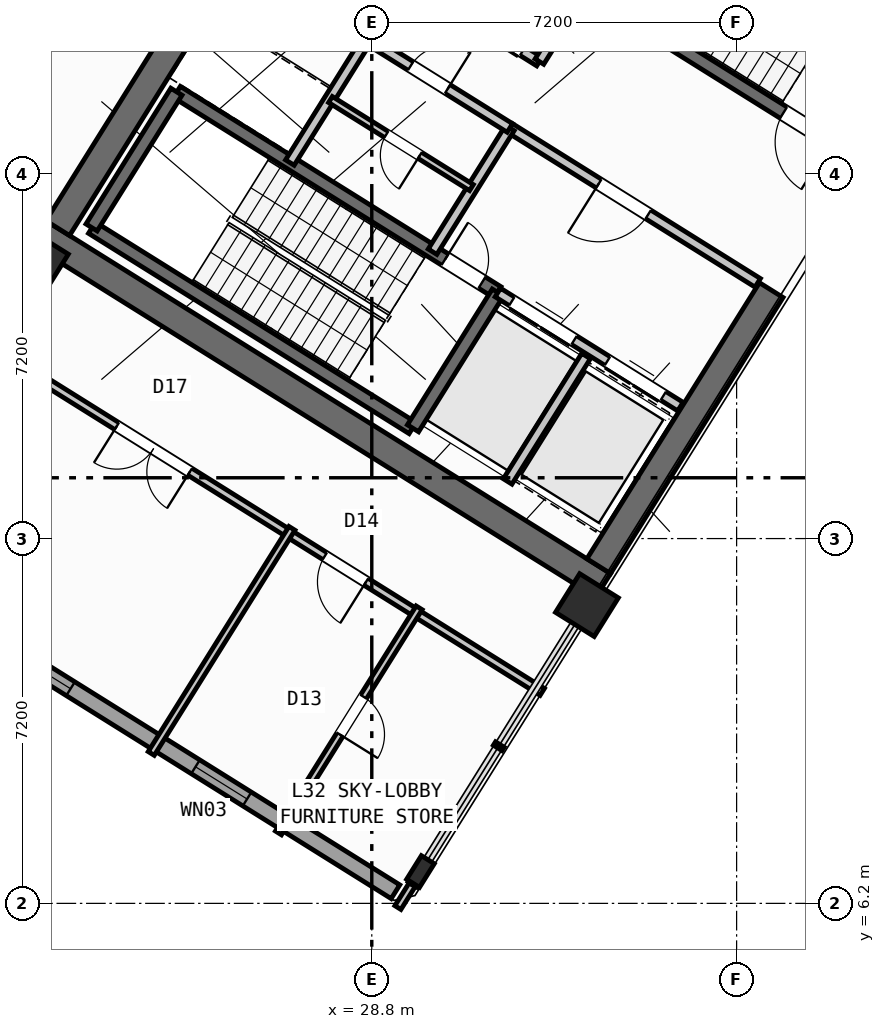
"""IFC4 building model, lengths in metres.
Left out: names, types, materials, properties, quantities, classifications, styles, units other than length and angle.
Written with IfcOpenShell. Run it as: python <this file> out.ifc"""

import sys

from ifc_helpers import new_model, si_unit, direction, frame, frame_2d, origin, origin_2d, place, context, subcontext, project, spatial, rectangle, hollow_rectangle, i_section, extrude, source, transform, mapped, element, fill, save


model = new_model("IFC4")
c1 = context("Model", 3, precision=1e-05, world=origin(), true_north=direction((0.0, 1.0)))
c2 = subcontext(c1, "Body", "Model", "MODEL_VIEW")
j1 = project(units=[si_unit("LENGTHUNIT", "METRE"), si_unit("PLANEANGLEUNIT", "RADIAN")], contexts=[c1])
p1 = place(None, origin())
s1 = spatial("IfcSite", under=j1, at=p1, CompositionType="ELEMENT")
p2 = place(p1, origin())
s2 = spatial("IfcBuilding", under=s1, at=p2, CompositionType="ELEMENT")
p3 = place(p2, frame((0.0, 0.0, 127.8)))
s3 = spatial("IfcBuildingStorey", under=s2, at=p3, CompositionType="ELEMENT", Elevation=127.8)
p4 = place(p3, frame((33.366, 12.477, 0.0), z_axis=(0.0, 0.0, 1.0), x_axis=(-0.848047359947, 0.529920442413, 0.0)))
e1 = element("IfcWall", 1, at=p4, inside=s3, PredefinedType="SHEAR", context=c2, shape_type="SweptSolid", body=[
    extrude(rectangle(XDim=13.14, YDim=0.55, at=frame_2d((6.57, 0.0))), origin(), (0.0, 0.0, 1.0), 4.55),
])
p5 = place(p3, frame((36.683, 18.304, 0.0), z_axis=(0.0, 0.0, 1.0), x_axis=(-0.529896466841, -0.848062341122, 0.0)))
e2 = element("IfcWall", 2, at=p5, inside=s3, PredefinedType="SHEAR", context=c2, shape_type="SweptSolid", body=[
    extrude(rectangle(XDim=6.425, YDim=0.55, at=frame_2d((3.212, 0.0))), origin(), (0.0, 0.0, 1.0), 4.55),
])
p6 = place(p3, frame((26.007, 24.976, 0.0), z_axis=(0.0, 0.0, 1.0), x_axis=(-0.529923795287, -0.848045264823, 0.0)))
e3 = element("IfcWall", 3, at=p6, inside=s3, PredefinedType="SHEAR", context=c2, shape_type="SweptSolid", body=[
    extrude(rectangle(XDim=6.425, YDim=0.55, at=frame_2d((3.212, 0.0))), origin(), (0.0, 0.0, 1.0), 4.55),
])
m1 = source(origin(), c2, "Body", "SweptSolid", [
    extrude(hollow_rectangle(XDim=0.9, YDim=0.9, WallThickness=0.036, at=origin_2d()), origin(), (0.0, 0.0, 1.0), 4.8),
])
p7 = place(p3, frame((33.046, 12.087, 0.0), z_axis=(0.0, 0.0, 1.0), x_axis=(-0.848048096156, 0.529919264233, 0.0)))
e4 = element("IfcColumn", 4, at=p7, inside=s3, PredefinedType="COLUMN", context=c2, shape_type="MappedRepresentation", body=[
    mapped(m1, transform((0.0, 0.0, 0.0), scale=1.0)),
])
m2 = source(origin(), c2, "Body", "SweptSolid", [
    extrude(i_section(OverallWidth=0.3, OverallDepth=0.55, WebThickness=0.015, FlangeThickness=0.029, at=origin_2d()), origin(), (0.0, 0.0, 1.0), 4.8),
])
p8 = place(p3, frame((29.761, 6.829, 0.0), z_axis=(0.0, 0.0, 1.0), x_axis=(-0.848048096156, 0.529919264233, 0.0)))
e5 = element("IfcColumn", 5, at=p8, inside=s3, PredefinedType="COLUMN", context=c2, shape_type="MappedRepresentation", body=[
    mapped(m2, transform((0.0, 0.0, 0.0), scale=1.0)),
])
p9 = place(p3, frame((22.191, 18.87, 0.0), z_axis=(0.0, 0.0, 1.0), x_axis=(-0.848048096156, 0.529919264233, 0.0)))
e6 = element("IfcColumn", 6, at=p9, inside=s3, PredefinedType="COLUMN", context=c2, shape_type="MappedRepresentation", body=[
    mapped(m1, transform((0.0, 0.0, 0.0), scale=1.0)),
])
p10 = place(p3, frame((29.268, 6.429, 0.0), z_axis=(0.0, 0.0, 1.0), x_axis=(-0.848049971435, 0.529916263149, 0.0)))
e7 = element("IfcWall", 7, at=p10, inside=s3, PredefinedType="STANDARD", context=c2, shape_type="SweptSolid", body=[
    extrude(rectangle(XDim=31.588, YDim=0.32, at=frame_2d((15.794, 0.0))), origin(), (0.0, 0.0, 1.0), 4.55),
])
p11 = place(p10, frame((15.901, 0.0, 0.0)))
e8 = element("IfcOpeningElement", 8, at=p11, cuts=e7, PredefinedType="OPENING", context=c2, shape_type="SweptSolid", body=[
    extrude(rectangle(XDim=1.2, YDim=2.15, at=frame_2d((0.6, 1.075))), frame((0.0, 0.17, 0.0), z_axis=(0.0, -1.0, 0.0), x_axis=(1.0, 0.0, 0.0)), (0.0, 0.0, 1.0), 0.34),
])
p12 = place(p10, frame((3.454, 0.0, 0.95)))
e9 = element("IfcOpeningElement", 9, at=p12, cuts=e7, PredefinedType="OPENING", context=c2, shape_type="SweptSolid", body=[
    extrude(rectangle(XDim=1.2, YDim=1.4, at=frame_2d((0.6, 0.7))), frame((0.0, 0.17, 0.0), z_axis=(0.0, -1.0, 0.0), x_axis=(1.0, 0.0, 0.0)), (0.0, 0.0, 1.0), 0.34),
])
p13 = place(p10, frame((7.561, 0.0, 0.85)))
e10 = element("IfcOpeningElement", 10, at=p13, cuts=e7, PredefinedType="OPENING", context=c2, shape_type="SweptSolid", body=[
    extrude(rectangle(XDim=1.8, YDim=1.5, at=frame_2d((0.9, 0.75))), frame((0.0, 0.17, 0.0), z_axis=(0.0, -1.0, 0.0), x_axis=(1.0, 0.0, 0.0)), (0.0, 0.0, 1.0), 0.34),
])
p14 = place(p10, frame((21.594, 0.0, 0.95)))
e11 = element("IfcOpeningElement", 11, at=p14, cuts=e7, PredefinedType="OPENING", context=c2, shape_type="SweptSolid", body=[
    extrude(rectangle(XDim=1.2, YDim=1.4, at=frame_2d((0.6, 0.7))), frame((0.0, 0.17, 0.0), z_axis=(0.0, -1.0, 0.0), x_axis=(1.0, 0.0, 0.0)), (0.0, 0.0, 1.0), 0.34),
])
p15 = place(p10, frame((29.878, 0.0, 1.0)))
e12 = element("IfcOpeningElement", 12, at=p15, cuts=e7, PredefinedType="OPENING", context=c2, shape_type="SweptSolid", body=[
    extrude(rectangle(XDim=0.9, YDim=1.25, at=frame_2d((0.45, 0.625))), frame((0.0, 0.17, 0.0), z_axis=(0.0, -1.0, 0.0), x_axis=(1.0, 0.0, 0.0)), (0.0, 0.0, 1.0), 0.34),
])
p16 = place(p10, frame((27.364, 0.0, 1.0)))
e13 = element("IfcOpeningElement", 13, at=p16, cuts=e7, PredefinedType="OPENING", context=c2, shape_type="SweptSolid", body=[
    extrude(rectangle(XDim=0.9, YDim=1.25, at=frame_2d((0.45, 0.625))), frame((0.0, 0.17, 0.0), z_axis=(0.0, -1.0, 0.0), x_axis=(1.0, 0.0, 0.0)), (0.0, 0.0, 1.0), 0.34),
])
p17 = place(p3, frame((29.605, 15.581, 0.0), z_axis=(0.0, 0.0, 1.0), x_axis=(-0.848036911448, 0.529937163087, 0.0)))
e14 = element("IfcWall", 14, at=p17, inside=s3, PredefinedType="SHEAR", context=c2, shape_type="SweptSolid", body=[
    extrude(rectangle(XDim=7.46, YDim=0.26, at=frame_2d((3.73, 0.0))), origin(), (0.0, 0.0, 1.0), 4.55),
])
p18 = place(p3, frame((31.28, 18.261, 0.0), z_axis=(0.0, 0.0, 1.0), x_axis=(-0.848051618787, 0.529913626805, 0.0)))
e15 = element("IfcWall", 15, at=p18, inside=s3, PredefinedType="SHEAR", context=c2, shape_type="SweptSolid", body=[
    extrude(rectangle(XDim=7.46, YDim=0.26, at=frame_2d((3.73, 0.0))), origin(), (0.0, 0.0, 1.0), 4.55),
])
p19 = place(p18, frame((0.36, 0.0, 0.0)))
e16 = element("IfcOpeningElement", 16, at=p19, cuts=e15, PredefinedType="OPENING", context=c2, shape_type="SweptSolid", body=[
    extrude(rectangle(XDim=0.86, YDim=2.05, at=frame_2d((0.43, 1.025))), frame((0.0, 0.14, 0.0), z_axis=(0.0, -1.0, 0.0), x_axis=(1.0, 0.0, 0.0)), (0.0, 0.0, 1.0), 0.28),
])
p20 = place(p3, frame((31.288, 18.256, 0.0), z_axis=(0.0, 0.0, 1.0), x_axis=(-0.529943379326, -0.848033026897, 0.0)))
e17 = element("IfcWall", 17, at=p20, inside=s3, PredefinedType="SHEAR", context=c2, shape_type="SweptSolid", body=[
    extrude(rectangle(XDim=3.16, YDim=0.26, at=frame_2d((1.58, 0.0))), origin(), (0.0, 0.0, 1.0), 4.55),
])
p21 = place(p3, frame((24.945, 22.22, 0.0), z_axis=(0.0, 0.0, 1.0), x_axis=(-0.529908658664, -0.84805472316, 0.0)))
e18 = element("IfcWall", 18, at=p21, inside=s3, PredefinedType="SHEAR", context=c2, shape_type="SweptSolid", body=[
    extrude(rectangle(XDim=3.16, YDim=0.26, at=frame_2d((1.58, 0.0))), origin(), (0.0, 0.0, 1.0), 4.55),
])
p22 = place(p3, frame((38.046, 21.108, 0.0), z_axis=(0.0, 0.0, 1.0), x_axis=(-0.848054434086, 0.529909121291, 0.0)))
e19 = element("IfcWall", 19, at=p22, inside=s3, PredefinedType="SHEAR", context=c2, shape_type="SweptSolid", body=[
    extrude(rectangle(XDim=7.33, YDim=0.26, at=frame_2d((3.665, 0.0))), origin(), (0.0, 0.0, 1.0), 4.55),
])
p23 = place(p22, frame((0.22, 0.0, 0.0)))
e20 = element("IfcOpeningElement", 20, at=p23, cuts=e19, PredefinedType="OPENING", context=c2, shape_type="SweptSolid", body=[
    extrude(rectangle(XDim=1.1, YDim=2.1, at=frame_2d((0.55, 1.05))), frame((0.0, 0.14, 0.0), z_axis=(0.0, -1.0, 0.0), x_axis=(1.0, 0.0, 0.0)), (0.0, 0.0, 1.0), 0.28),
])
p24 = place(p3, frame((34.891, 16.005, 0.0), z_axis=(0.0, 0.0, 1.0), x_axis=(-0.848062873452, 0.529895614884, 0.0)))
e21 = element("IfcWall", 21, at=p24, inside=s3, PredefinedType="STANDARD", context=c2, shape_type="SweptSolid", body=[
    extrude(rectangle(XDim=4.248, YDim=0.2, at=frame_2d((2.124, 0.0))), origin(), (0.0, 0.0, 1.0), 4.54),
])
p25 = place(p24, frame((0.398, 0.0, 0.0)))
e22 = element("IfcOpeningElement", 22, at=p25, cuts=e21, PredefinedType="OPENING", context=c2, shape_type="SweptSolid", body=[
    extrude(rectangle(XDim=1.3, YDim=2.2, at=frame_2d((0.65, 1.1))), frame((0.0, 0.11, 0.0), z_axis=(0.0, -1.0, 0.0), x_axis=(1.0, 0.0, 0.0)), (0.0, 0.0, 1.0), 0.22),
])
p26 = place(p24, frame((2.473, 0.0, 0.0)))
e23 = element("IfcOpeningElement", 23, at=p26, cuts=e21, PredefinedType="OPENING", context=c2, shape_type="SweptSolid", body=[
    extrude(rectangle(XDim=1.45, YDim=2.25, at=frame_2d((0.725, 1.125))), frame((0.0, 0.11, 0.0), z_axis=(0.0, -1.0, 0.0), x_axis=(1.0, 0.0, 0.0)), (0.0, 0.0, 1.0), 0.22),
])
p27 = place(p3, frame((36.417, 18.447, 0.0), z_axis=(0.0, 0.0, 1.0), x_axis=(-0.848064879198, 0.529892404805, 0.0)))
e24 = element("IfcWall", 24, at=p27, inside=s3, PredefinedType="STANDARD", context=c2, shape_type="SweptSolid", body=[
    extrude(rectangle(XDim=5.768, YDim=0.2, at=frame_2d((2.884, 0.0))), origin(), (0.0, 0.0, 1.0), 4.54),
])
p28 = place(p27, frame((2.548, 0.0, 0.0)))
e25 = element("IfcOpeningElement", 25, at=p28, cuts=e24, PredefinedType="OPENING", context=c2, shape_type="SweptSolid", body=[
    extrude(rectangle(XDim=1.15, YDim=2.1, at=frame_2d((0.575, 1.05))), frame((0.0, 0.11, 0.0), z_axis=(0.0, -1.0, 0.0), x_axis=(1.0, 0.0, 0.0)), (0.0, 0.0, 1.0), 0.22),
])
p29 = place(p3, frame((32.108, 22.814, 0.0), z_axis=(0.0, 0.0, 1.0), x_axis=(-0.848042229521, 0.529928652696, 0.0)))
e26 = element("IfcWall", 26, at=p29, inside=s3, PredefinedType="STANDARD", context=c2, shape_type="SweptSolid", body=[
    extrude(rectangle(XDim=5.62, YDim=0.2, at=frame_2d((2.81, 0.0))), origin(), (0.0, 0.0, 1.0), 4.54),
])
p30 = place(p29, frame((0.39, 0.0, 0.0)))
e27 = element("IfcOpeningElement", 27, at=p30, cuts=e26, PredefinedType="OPENING", context=c2, shape_type="SweptSolid", body=[
    extrude(rectangle(XDim=1.1, YDim=2.15, at=frame_2d((0.55, 1.075))), frame((0.0, 0.11, 0.0), z_axis=(0.0, -1.0, 0.0), x_axis=(1.0, 0.0, 0.0)), (0.0, 0.0, 1.0), 0.22),
])
p31 = place(p29, frame((2.25, 0.0, 0.0)))
e28 = element("IfcOpeningElement", 28, at=p31, cuts=e26, PredefinedType="OPENING", context=c2, shape_type="SweptSolid", body=[
    extrude(rectangle(XDim=1.1, YDim=2.15, at=frame_2d((0.55, 1.075))), frame((0.0, 0.11, 0.0), z_axis=(0.0, -1.0, 0.0), x_axis=(1.0, 0.0, 0.0)), (0.0, 0.0, 1.0), 0.22),
])
p32 = place(p29, frame((4.11, 0.0, 0.0)))
e29 = element("IfcOpeningElement", 29, at=p32, cuts=e26, PredefinedType="OPENING", context=c2, shape_type="SweptSolid", body=[
    extrude(rectangle(XDim=1.1, YDim=2.15, at=frame_2d((0.55, 1.075))), frame((0.0, 0.11, 0.0), z_axis=(0.0, -1.0, 0.0), x_axis=(1.0, 0.0, 0.0)), (0.0, 0.0, 1.0), 0.22),
])
p33 = place(p3, frame((32.982, 24.213, 0.0), z_axis=(0.0, 0.0, 1.0), x_axis=(-0.529839334948, -0.84809803628, 0.0)))
e30 = element("IfcWall", 30, at=p33, inside=s3, PredefinedType="STANDARD", context=c2, shape_type="SweptSolid", body=[
    extrude(rectangle(XDim=1.65, YDim=0.2, at=frame_2d((0.825, 0.0))), origin(), (0.0, 0.0, 1.0), 4.54),
])
p34 = place(p3, frame((33.029, 17.003, 0.0), z_axis=(0.0, 0.0, 1.0), x_axis=(-0.529916267533, -0.848049968695, 0.0)))
e31 = element("IfcWall", 31, at=p34, inside=s3, PredefinedType="STANDARD", context=c2, shape_type="SweptSolid", body=[
    extrude(rectangle(XDim=2.92, YDim=0.2, at=frame_2d((1.46, 0.0))), origin(), (0.0, 0.0, 1.0), 4.54),
])
for number, where, z_axis, x_axis in (
    (32, (31.525, 21.504, 0.0), (0.0, 0.0, 1.0), (-0.53, -0.848, 0.0)),
    (33, (28.71, 23.263, 0.0), (0.0, 0.0, 1.0), (-0.53, -0.848, 0.0)),
):
    element("IfcWall", number, at=place(p3, frame(where, z_axis=z_axis, x_axis=x_axis)), inside=s3, PredefinedType="STANDARD", context=c2, shape_type="SweptSolid", body=[
        extrude(rectangle(XDim=2.88, YDim=0.2, at=frame_2d((1.44, 0.0))), origin(), (0.0, 0.0, 1.0), 4.54),
    ])
p35 = place(p3, frame((31.525, 21.504, 0.0), z_axis=(0.0, 0.0, 1.0), x_axis=(-0.848040211232, 0.529931882541, 0.0)))
e34 = element("IfcWall", 34, at=p35, inside=s3, PredefinedType="STANDARD", context=c2, shape_type="SweptSolid", body=[
    extrude(rectangle(XDim=6.218, YDim=0.2, at=frame_2d((3.109, 0.0))), origin(), (0.0, 0.0, 1.0), 4.54),
])
p36 = place(p35, frame((4.4, 0.0, 0.0)))
e35 = element("IfcOpeningElement", 35, at=p36, cuts=e34, PredefinedType="OPENING", context=c2, shape_type="SweptSolid", body=[
    extrude(rectangle(XDim=0.86, YDim=2.05, at=frame_2d((0.43, 1.025))), frame((0.0, 0.11, 0.0), z_axis=(0.0, -1.0, 0.0), x_axis=(1.0, 0.0, 0.0)), (0.0, 0.0, 1.0), 0.22),
])
p37 = place(p35, frame((1.45, 0.0, 0.0)))
e36 = element("IfcOpeningElement", 36, at=p37, cuts=e34, PredefinedType="OPENING", context=c2, shape_type="SweptSolid", body=[
    extrude(rectangle(XDim=0.86, YDim=2.05, at=frame_2d((0.43, 1.025))), frame((0.0, 0.11, 0.0), z_axis=(0.0, -1.0, 0.0), x_axis=(1.0, 0.0, 0.0)), (0.0, 0.0, 1.0), 0.22),
])
p38 = place(p3, frame((30.766, 20.327, 0.0), z_axis=(0.0, 0.0, 1.0), x_axis=(-0.848052663127, 0.529911955482, 0.0)))
e37 = element("IfcWall", 37, at=p38, inside=s3, PredefinedType="PLUMBINGWALL", context=c2, shape_type="SweptSolid", body=[
    extrude(rectangle(XDim=3.28, YDim=0.14, at=frame_2d((1.64, 0.0))), origin(), (0.0, 0.0, 1.0), 4.54),
])
p39 = place(p38, frame((1.2, 0.0, 0.0)))
e38 = element("IfcOpeningElement", 38, at=p39, cuts=e37, PredefinedType="OPENING", context=c2, shape_type="SweptSolid", body=[
    extrude(rectangle(XDim=0.78, YDim=2.05, at=frame_2d((0.39, 1.025))), frame((0.0, 0.08, 0.0), z_axis=(0.0, -1.0, 0.0), x_axis=(1.0, 0.0, 0.0)), (0.0, 0.0, 1.0), 0.16),
])
p40 = place(p3, frame((32.164, 10.374, 0.0), z_axis=(0.0, 0.0, 1.0), x_axis=(-0.848044107957, 0.529925646633, 0.0)))
e39 = element("IfcWall", 39, at=p40, inside=s3, PredefinedType="PARTITIONING", context=c2, shape_type="SweptSolid", body=[
    extrude(rectangle(XDim=15.57, YDim=0.16, at=frame_2d((7.785, 0.0))), origin(), (0.0, 0.0, 1.0), 4.54),
])
p41 = place(p40, frame((4.1, 0.0, 0.0)))
e40 = element("IfcOpeningElement", 40, at=p41, cuts=e39, PredefinedType="OPENING", context=c2, shape_type="SweptSolid", body=[
    extrude(rectangle(XDim=0.96, YDim=2.08, at=frame_2d((0.48, 1.04))), frame((0.0, 0.09, 0.0), z_axis=(0.0, -1.0, 0.0), x_axis=(1.0, 0.0, 0.0)), (0.0, 0.0, 1.0), 0.18),
])
p42 = place(p40, frame((8.2, 0.0, 0.0)))
e41 = element("IfcOpeningElement", 41, at=p42, cuts=e39, PredefinedType="OPENING", context=c2, shape_type="SweptSolid", body=[
    extrude(rectangle(XDim=1.7, YDim=2.2, at=frame_2d((0.85, 1.1))), frame((0.0, 0.09, 0.0), z_axis=(0.0, -1.0, 0.0), x_axis=(1.0, 0.0, 0.0)), (0.0, 0.0, 1.0), 0.18),
])
p43 = place(p3, frame((29.735, 12.034, 0.0), z_axis=(0.0, 0.0, 1.0), x_axis=(-0.529890046623, -0.848066352646, 0.0)))
e42 = element("IfcWall", 42, at=p43, inside=s3, PredefinedType="PLUMBINGWALL", context=c2, shape_type="SweptSolid", body=[
    extrude(rectangle(XDim=5.24, YDim=0.14, at=frame_2d((2.62, 0.0))), origin(), (0.0, 0.0, 1.0), 4.54),
])
p44 = place(p43, frame((2.07, 0.0, 0.0)))
e43 = element("IfcOpeningElement", 43, at=p44, cuts=e42, PredefinedType="OPENING", context=c2, shape_type="SweptSolid", body=[
    extrude(rectangle(XDim=0.88, YDim=2.08, at=frame_2d((0.44, 1.04))), frame((0.0, 0.08, 0.0), z_axis=(0.0, -1.0, 0.0), x_axis=(1.0, 0.0, 0.0)), (0.0, 0.0, 1.0), 0.16),
])
p45 = place(p3, frame((29.609, 6.586, 0.0), z_axis=(0.0, 0.0, 1.0), x_axis=(-0.530117963224, -0.847923902875, 0.0)))
e44 = element("IfcWall", 44, at=p45, inside=s3, PredefinedType="PLUMBINGWALL", context=c2, shape_type="SweptSolid", body=[
    extrude(rectangle(XDim=0.553, YDim=0.14, at=frame_2d((0.277, 0.0))), origin(), (0.0, 0.0, 1.0), 4.54),
])
p46 = place(p3, frame((27.225, 13.602, 0.0), z_axis=(0.0, 0.0, 1.0), x_axis=(-0.529944493599, -0.848032330577, 0.0)))
e45 = element("IfcWall", 45, at=p46, inside=s3, PredefinedType="PLUMBINGWALL", context=c2, shape_type="SweptSolid", body=[
    extrude(rectangle(XDim=5.24, YDim=0.14, at=frame_2d((2.62, 0.0))), origin(), (0.0, 0.0, 1.0), 4.54),
])
m3 = source(origin(), c2, "Body", "SweptSolid", [
    extrude(rectangle(XDim=1.2, YDim=1.4, at=frame_2d((0.6, 0.7))), frame((0.0, 0.03, 0.0), z_axis=(0.0, -1.0, 0.0), x_axis=(1.0, 0.0, 0.0)), (0.0, 0.0, 1.0), 0.06),
])
p47 = place(p12, origin())
e46 = element("IfcWindow", 46, at=p47, inside=s3, PartitioningType="SINGLE_PANEL", PredefinedType="WINDOW", context=c2, shape_type="MappedRepresentation", body=[
    mapped(m3, transform((0.0, 0.0, 0.0), scale=1.0)),
])
fill(e9, e46)
m4 = source(origin(), c2, "Body", "SweptSolid", [
    extrude(rectangle(XDim=1.8, YDim=1.5, at=frame_2d((0.9, 0.75))), frame((0.0, 0.03, 0.0), z_axis=(0.0, -1.0, 0.0), x_axis=(1.0, 0.0, 0.0)), (0.0, 0.0, 1.0), 0.06),
])
p48 = place(p13, origin())
e47 = element("IfcWindow", 47, at=p48, inside=s3, PartitioningType="SINGLE_PANEL", PredefinedType="WINDOW", context=c2, shape_type="MappedRepresentation", body=[
    mapped(m4, transform((0.0, 0.0, 0.0), scale=1.0)),
])
fill(e10, e47)
m5 = source(origin(), c2, "Body", "SweptSolid", [
    extrude(rectangle(XDim=0.86, YDim=2.05, at=frame_2d((0.43, 1.025))), frame((0.0, 0.025, 0.0), z_axis=(0.0, -1.0, 0.0), x_axis=(1.0, 0.0, 0.0)), (0.0, 0.0, 1.0), 0.05),
])
p49 = place(p19, frame((0.86, 0.0, 0.0), z_axis=(0.0, 0.0, 1.0), x_axis=(-1.0, 0.0, 0.0)))
e48 = element("IfcDoor", 48, at=p49, inside=s3, OperationType="SINGLE_SWING_LEFT", PredefinedType="DOOR", context=c2, shape_type="MappedRepresentation", body=[
    mapped(m5, transform((0.0, 0.0, 0.0), scale=1.0)),
])
fill(e16, e48)
m6 = source(origin(), c2, "Body", "SweptSolid", [
    extrude(rectangle(XDim=1.1, YDim=2.1, at=frame_2d((0.55, 1.05))), frame((0.0, 0.025, 0.0), z_axis=(0.0, -1.0, 0.0), x_axis=(1.0, 0.0, 0.0)), (0.0, 0.0, 1.0), 0.05),
])
p50 = place(p23, origin())
e49 = element("IfcDoor", 49, at=p50, inside=s3, OperationType="SINGLE_SWING_LEFT", PredefinedType="DOOR", context=c2, shape_type="MappedRepresentation", body=[
    mapped(m6, transform((0.0, 0.0, 0.0), scale=1.0)),
])
fill(e20, e49)
m7 = source(origin(), c2, "Body", "SweptSolid", [
    extrude(rectangle(XDim=1.15, YDim=2.1, at=frame_2d((0.575, 1.05))), frame((0.0, 0.025, 0.0), z_axis=(0.0, -1.0, 0.0), x_axis=(1.0, 0.0, 0.0)), (0.0, 0.0, 1.0), 0.05),
])
p51 = place(p28, origin())
e50 = element("IfcDoor", 50, at=p51, inside=s3, OperationType="SINGLE_SWING_RIGHT", PredefinedType="DOOR", context=c2, shape_type="MappedRepresentation", body=[
    mapped(m7, transform((0.0, 0.0, 0.0), scale=1.0)),
])
fill(e25, e50)
m8 = source(origin(), c2, "Body", "SweptSolid", [
    extrude(rectangle(XDim=1.3, YDim=2.2, at=frame_2d((0.65, 1.1))), frame((0.0, 0.025, 0.0), z_axis=(0.0, -1.0, 0.0), x_axis=(1.0, 0.0, 0.0)), (0.0, 0.0, 1.0), 0.05),
])
p52 = place(p25, origin())
e51 = element("IfcDoor", 51, at=p52, inside=s3, OperationType="DOUBLE_DOOR_SLIDING", PredefinedType="DOOR", context=c2, shape_type="MappedRepresentation", body=[
    mapped(m8, transform((0.0, 0.0, 0.0), scale=1.0)),
])
fill(e22, e51)
m9 = source(origin(), c2, "Body", "SweptSolid", [
    extrude(rectangle(XDim=1.45, YDim=2.25, at=frame_2d((0.725, 1.125))), frame((0.0, 0.025, 0.0), z_axis=(0.0, -1.0, 0.0), x_axis=(1.0, 0.0, 0.0)), (0.0, 0.0, 1.0), 0.05),
])
p53 = place(p26, origin())
e52 = element("IfcDoor", 52, at=p53, inside=s3, OperationType="DOUBLE_DOOR_SLIDING", PredefinedType="DOOR", context=c2, shape_type="MappedRepresentation", body=[
    mapped(m9, transform((0.0, 0.0, 0.0), scale=1.0)),
])
fill(e23, e52)
p54 = place(p37, frame((0.86, 0.0, 0.0), z_axis=(0.0, 0.0, 1.0), x_axis=(-1.0, 0.0, 0.0)))
e53 = element("IfcDoor", 53, at=p54, inside=s3, OperationType="SINGLE_SWING_RIGHT", PredefinedType="DOOR", context=c2, shape_type="MappedRepresentation", body=[
    mapped(m5, transform((0.0, 0.0, 0.0), scale=1.0)),
])
fill(e36, e53)
m10 = source(origin(), c2, "Body", "SweptSolid", [
    extrude(rectangle(XDim=0.78, YDim=2.05, at=frame_2d((0.39, 1.025))), frame((0.0, 0.025, 0.0), z_axis=(0.0, -1.0, 0.0), x_axis=(1.0, 0.0, 0.0)), (0.0, 0.0, 1.0), 0.05),
])
p55 = place(p39, origin())
e54 = element("IfcDoor", 54, at=p55, inside=s3, OperationType="SINGLE_SWING_LEFT", PredefinedType="DOOR", context=c2, shape_type="MappedRepresentation", body=[
    mapped(m10, transform((0.0, 0.0, 0.0), scale=1.0)),
])
fill(e38, e54)
m11 = source(origin(), c2, "Body", "SweptSolid", [
    extrude(rectangle(XDim=0.88, YDim=2.08, at=frame_2d((0.44, 1.04))), frame((0.0, 0.025, 0.0), z_axis=(0.0, -1.0, 0.0), x_axis=(1.0, 0.0, 0.0)), (0.0, 0.0, 1.0), 0.05),
])
p56 = place(p44, origin())
e55 = element("IfcDoor", 55, at=p56, inside=s3, OperationType="SINGLE_SWING_RIGHT", PredefinedType="DOOR", context=c2, shape_type="MappedRepresentation", body=[
    mapped(m11, transform((0.0, 0.0, 0.0), scale=1.0)),
])
fill(e43, e55)
m12 = source(origin(), c2, "Body", "SweptSolid", [
    extrude(rectangle(XDim=0.96, YDim=2.08, at=frame_2d((0.48, 1.04))), frame((0.0, 0.025, 0.0), z_axis=(0.0, -1.0, 0.0), x_axis=(1.0, 0.0, 0.0)), (0.0, 0.0, 1.0), 0.05),
])
p57 = place(p41, origin())
e56 = element("IfcDoor", 56, at=p57, inside=s3, OperationType="SINGLE_SWING_LEFT", PredefinedType="DOOR", context=c2, shape_type="MappedRepresentation", body=[
    mapped(m12, transform((0.0, 0.0, 0.0), scale=1.0)),
])
fill(e40, e56)
m13 = source(origin(), c2, "Body", "SweptSolid", [
    extrude(rectangle(XDim=1.7, YDim=2.2, at=frame_2d((0.85, 1.1))), frame((0.0, 0.025, 0.0), z_axis=(0.0, -1.0, 0.0), x_axis=(1.0, 0.0, 0.0)), (0.0, 0.0, 1.0), 0.05),
])
p58 = place(p42, origin())
e57 = element("IfcDoor", 57, at=p58, inside=s3, OperationType="DOUBLE_DOOR_SINGLE_SWING", PredefinedType="DOOR", context=c2, shape_type="MappedRepresentation", body=[
    mapped(m13, transform((0.0, 0.0, 0.0), scale=1.0)),
])
fill(e41, e57)
save(model, sys.argv[1])
